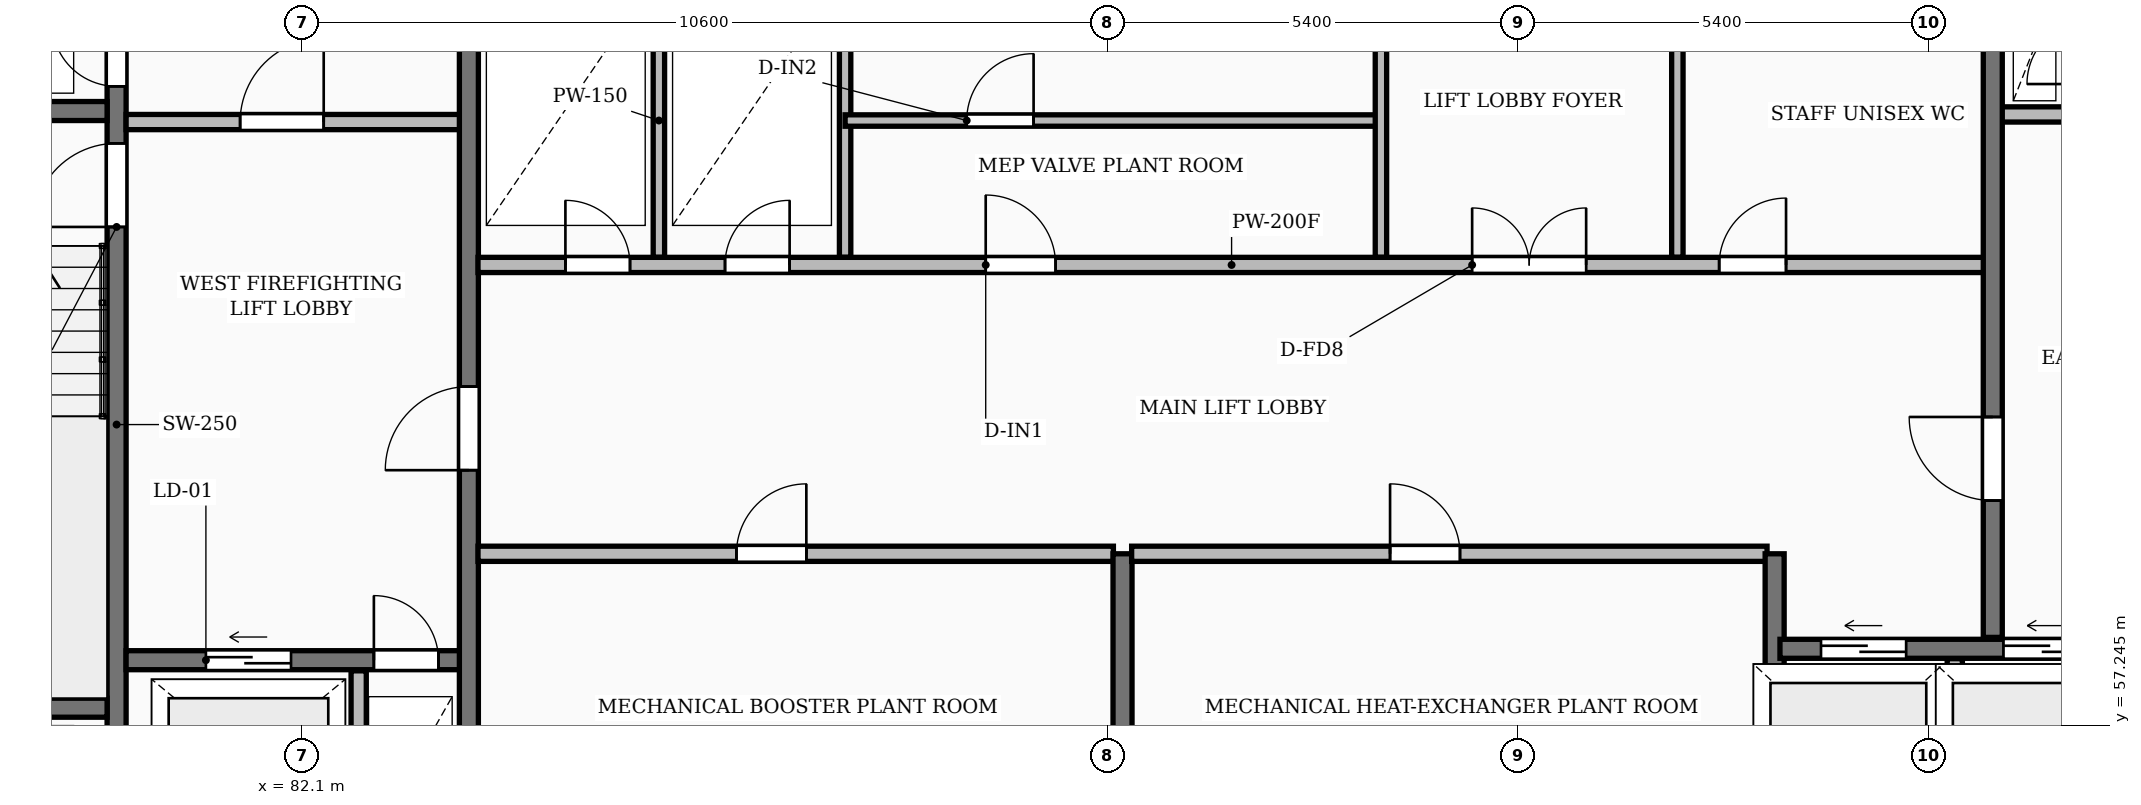
"""IFC4 building model, lengths in metres.
Left out: names, types, materials, properties, quantities, classifications, styles, units other than length and angle.
Written with IfcOpenShell. Run it as: python <this file> out.ifc"""

import sys

from ifc_helpers import new_model, si_unit, direction, frame, frame_2d, origin, place, context, subcontext, project, spatial, rectangle, extrude, element, fill, save


model = new_model("IFC4")
c1 = context("Model", 3, precision=1e-05, world=origin(), true_north=direction((0.0, 1.0)))
c2 = subcontext(c1, "Body", "Model", "MODEL_VIEW")
j1 = project(units=[si_unit("LENGTHUNIT", "METRE"), si_unit("PLANEANGLEUNIT", "RADIAN")], contexts=[c1])
p1 = place(None, origin())
s1 = spatial("IfcSite", under=j1, at=p1, CompositionType="ELEMENT")
p2 = place(p1, origin())
s2 = spatial("IfcBuilding", under=s1, at=p2, CompositionType="ELEMENT")
p3 = place(p2, frame((0.0, 0.0, 204.35)))
s3 = spatial("IfcBuildingStorey", under=s2, at=p3, CompositionType="ELEMENT", Elevation=204.35)
p4 = place(p3, frame((79.665, 55.4, 0.0), z_axis=(0.0, 0.0, 1.0), x_axis=(0.0, 1.0, 0.0)))
e1 = element("IfcWall", 1, at=p4, inside=s3, PredefinedType="SHEAR", context=c2, shape_type="SweptSolid", body=[
    extrude(rectangle(XDim=11.6, YDim=0.25, at=frame_2d((5.8, 0.0))), origin(), (0.0, 0.0, 1.0), 3.25),
])
p5 = place(p4, frame((0.55, 0.0, 0.0)))
e2 = element("IfcOpeningElement", 2, at=p5, cuts=e1, PredefinedType="OPENING", context=c2, shape_type="SweptSolid", body=[
    extrude(rectangle(XDim=0.85, YDim=2.05, at=frame_2d((0.425, 1.025))), frame((0.0, 0.135, 0.0), z_axis=(0.0, -1.0, 0.0), x_axis=(1.0, 0.0, 0.0)), (0.0, 0.0, 1.0), 0.27),
])
p6 = place(p4, frame((8.4, 0.0, 0.0)))
e3 = element("IfcOpeningElement", 3, at=p6, cuts=e1, PredefinedType="OPENING", context=c2, shape_type="SweptSolid", body=[
    extrude(rectangle(XDim=1.1, YDim=2.1, at=frame_2d((0.55, 1.05))), frame((0.0, 0.135, 0.0), z_axis=(0.0, -1.0, 0.0), x_axis=(1.0, 0.0, 0.0)), (0.0, 0.0, 1.0), 0.27),
])
p7 = place(p4, frame((10.25, 0.0, 0.0)))
e4 = element("IfcOpeningElement", 4, at=p7, cuts=e1, PredefinedType="OPENING", context=c2, shape_type="SweptSolid", body=[
    extrude(rectangle(XDim=0.85, YDim=2.05, at=frame_2d((0.425, 1.025))), frame((0.0, 0.135, 0.0), z_axis=(0.0, -1.0, 0.0), x_axis=(1.0, 0.0, 0.0)), (0.0, 0.0, 1.0), 0.27),
])
for number, where, z_axis, x_axis in (
    (5, (76.3, 57.475, 0.0), (0.0, 0.0, 1.0), (1.0, 0.0, 0.0)),
    (6, (76.3, 65.325, 0.0), (0.0, 0.0, 1.0), (1.0, 0.0, 0.0)),
):
    element("IfcWall", number, at=place(p3, frame(where, z_axis=z_axis, x_axis=x_axis)), inside=s3, PredefinedType="SHEAR", context=c2, shape_type="SweptSolid", body=[
        extrude(rectangle(XDim=3.24, YDim=0.25, at=frame_2d((1.62, 0.0))), origin(), (0.0, 0.0, 1.0), 3.25),
    ])
p8 = place(p3, frame((79.79, 58.1, 0.0), z_axis=(0.0, 0.0, 1.0), x_axis=(1.0, 0.0, 0.0)))
e7 = element("IfcWall", 7, at=p8, inside=s3, PredefinedType="SHEAR", context=c2, shape_type="SweptSolid", body=[
    extrude(rectangle(XDim=4.39, YDim=0.25, at=frame_2d((2.195, 0.0))), origin(), (0.0, 0.0, 1.0), 3.25),
])
p9 = place(p8, frame((1.05, 0.0, 0.0)))
e8 = element("IfcOpeningElement", 8, at=p9, cuts=e7, PredefinedType="OPENING", context=c2, shape_type="SweptSolid", body=[
    extrude(rectangle(XDim=1.12, YDim=2.12, at=frame_2d((0.56, 1.06))), frame((0.0, 0.135, 0.0), z_axis=(0.0, -1.0, 0.0), x_axis=(1.0, 0.0, 0.0)), (0.0, 0.0, 1.0), 0.27),
])
p10 = place(p8, frame((3.26, 0.0, 0.0)))
e9 = element("IfcOpeningElement", 9, at=p10, cuts=e7, PredefinedType="OPENING", context=c2, shape_type="SweptSolid", body=[
    extrude(rectangle(XDim=0.85, YDim=2.05, at=frame_2d((0.425, 1.025))), frame((0.0, 0.135, 0.0), z_axis=(0.0, -1.0, 0.0), x_axis=(1.0, 0.0, 0.0)), (0.0, 0.0, 1.0), 0.27),
])
p11 = place(p3, frame((82.85, 55.4, 0.0), z_axis=(0.0, 0.0, 1.0), x_axis=(0.0, 1.0, 0.0)))
e10 = element("IfcWall", 10, at=p11, inside=s3, PredefinedType="PARTITIONING", context=c2, shape_type="SweptSolid", body=[
    extrude(rectangle(XDim=2.56, YDim=0.2, at=frame_2d((1.28, 0.0))), origin(), (0.0, 0.0, 1.0), 2.98),
])
p12 = place(p3, frame((79.79, 65.18, 0.0), z_axis=(0.0, 0.0, 1.0), x_axis=(1.0, 0.0, 0.0)))
e11 = element("IfcWall", 11, at=p12, inside=s3, PredefinedType="PARTITIONING", context=c2, shape_type="SweptSolid", body=[
    extrude(rectangle(XDim=4.39, YDim=0.2, at=frame_2d((2.195, 0.0))), origin(), (0.0, 0.0, 1.0), 2.98),
])
p13 = place(p12, frame((1.5, 0.0, 0.0)))
e12 = element("IfcOpeningElement", 12, at=p13, cuts=e11, PredefinedType="OPENING", context=c2, shape_type="SweptSolid", body=[
    extrude(rectangle(XDim=1.1, YDim=2.1, at=frame_2d((0.55, 1.05))), frame((0.0, 0.11, 0.0), z_axis=(0.0, -1.0, 0.0), x_axis=(1.0, 0.0, 0.0)), (0.0, 0.0, 1.0), 0.22),
])
p14 = place(p3, frame((84.3, 55.4, 0.0), z_axis=(0.0, 0.0, 1.0), x_axis=(0.0, 1.0, 0.0)))
e13 = element("IfcWall", 13, at=p14, inside=s3, PredefinedType="SHEAR", context=c2, shape_type="SweptSolid", body=[
    extrude(rectangle(XDim=11.6, YDim=0.25, at=frame_2d((5.8, 0.0))), origin(), (0.0, 0.0, 1.0), 3.25),
])
p15 = place(p14, frame((5.2, 0.0, 0.0)))
e14 = element("IfcOpeningElement", 14, at=p15, cuts=e13, PredefinedType="OPENING", context=c2, shape_type="SweptSolid", body=[
    extrude(rectangle(XDim=1.1, YDim=2.1, at=frame_2d((0.55, 1.05))), frame((0.0, 0.135, 0.0), z_axis=(0.0, -1.0, 0.0), x_axis=(1.0, 0.0, 0.0)), (0.0, 0.0, 1.0), 0.27),
])
p16 = place(p3, frame((84.42, 59.5, 0.0), z_axis=(0.0, 0.0, 1.0), x_axis=(1.0, 0.0, 0.0)))
e15 = element("IfcWall", 15, at=p16, inside=s3, PredefinedType="PARTITIONING", context=c2, shape_type="SweptSolid", body=[
    extrude(rectangle(XDim=8.36, YDim=0.2, at=frame_2d((4.18, 0.0))), origin(), (0.0, 0.0, 1.0), 2.98),
])
p17 = place(p16, frame((3.4, 0.0, 0.0)))
e16 = element("IfcOpeningElement", 16, at=p17, cuts=e15, PredefinedType="OPENING", context=c2, shape_type="SweptSolid", body=[
    extrude(rectangle(XDim=0.92, YDim=2.08, at=frame_2d((0.46, 1.04))), frame((0.0, 0.11, 0.0), z_axis=(0.0, -1.0, 0.0), x_axis=(1.0, 0.0, 0.0)), (0.0, 0.0, 1.0), 0.22),
])
p18 = place(p3, frame((92.9, 55.4, 0.0), z_axis=(0.0, 0.0, 1.0), x_axis=(0.0, 1.0, 0.0)))
e17 = element("IfcWall", 17, at=p18, inside=s3, PredefinedType="SHEAR", context=c2, shape_type="SweptSolid", body=[
    extrude(rectangle(XDim=4.1, YDim=0.25, at=frame_2d((2.05, 0.0))), origin(), (0.0, 0.0, 1.0), 3.25),
])
p19 = place(p3, frame((93.02, 59.5, 0.0), z_axis=(0.0, 0.0, 1.0), x_axis=(1.0, 0.0, 0.0)))
e18 = element("IfcWall", 18, at=p19, inside=s3, PredefinedType="PARTITIONING", context=c2, shape_type="SweptSolid", body=[
    extrude(rectangle(XDim=8.36, YDim=0.2, at=frame_2d((4.18, 0.0))), origin(), (0.0, 0.0, 1.0), 2.98),
])
p20 = place(p19, frame((3.4, 0.0, 0.0)))
e19 = element("IfcOpeningElement", 19, at=p20, cuts=e18, PredefinedType="OPENING", context=c2, shape_type="SweptSolid", body=[
    extrude(rectangle(XDim=0.92, YDim=2.08, at=frame_2d((0.46, 1.04))), frame((0.0, 0.11, 0.0), z_axis=(0.0, -1.0, 0.0), x_axis=(1.0, 0.0, 0.0)), (0.0, 0.0, 1.0), 0.22),
])
p21 = place(p3, frame((101.48, 55.4, 0.0), z_axis=(0.0, 0.0, 1.0), x_axis=(0.0, 1.0, 0.0)))
e20 = element("IfcWall", 20, at=p21, inside=s3, PredefinedType="SHEAR", context=c2, shape_type="SweptSolid", body=[
    extrude(rectangle(XDim=4.1, YDim=0.25, at=frame_2d((2.05, 0.0))), origin(), (0.0, 0.0, 1.0), 3.25),
])
p22 = place(p3, frame((103.85, 55.4, 0.0), z_axis=(0.0, 0.0, 1.0), x_axis=(0.0, 1.0, 0.0)))
e21 = element("IfcWall", 21, at=p22, inside=s3, PredefinedType="PARTITIONING", context=c2, shape_type="SweptSolid", body=[
    extrude(rectangle(XDim=2.72, YDim=0.2, at=frame_2d((1.36, 0.0))), origin(), (0.0, 0.0, 1.0), 2.98),
])
p23 = place(p3, frame((101.55, 58.25, 0.0), z_axis=(0.0, 0.0, 1.0), x_axis=(1.0, 0.0, 0.0)))
e22 = element("IfcWall", 22, at=p23, inside=s3, PredefinedType="SHEAR", context=c2, shape_type="SweptSolid", body=[
    extrude(rectangle(XDim=4.6, YDim=0.25, at=frame_2d((2.3, 0.0))), origin(), (0.0, 0.0, 1.0), 3.25),
])
p24 = place(p23, frame((0.54, 0.0, 0.0)))
e23 = element("IfcOpeningElement", 23, at=p24, cuts=e22, PredefinedType="OPENING", context=c2, shape_type="SweptSolid", body=[
    extrude(rectangle(XDim=1.12, YDim=2.12, at=frame_2d((0.56, 1.06))), frame((0.0, 0.135, 0.0), z_axis=(0.0, -1.0, 0.0), x_axis=(1.0, 0.0, 0.0)), (0.0, 0.0, 1.0), 0.27),
])
p25 = place(p23, frame((2.94, 0.0, 0.0)))
e24 = element("IfcOpeningElement", 24, at=p25, cuts=e22, PredefinedType="OPENING", context=c2, shape_type="SweptSolid", body=[
    extrude(rectangle(XDim=1.12, YDim=2.12, at=frame_2d((0.56, 1.06))), frame((0.0, 0.135, 0.0), z_axis=(0.0, -1.0, 0.0), x_axis=(1.0, 0.0, 0.0)), (0.0, 0.0, 1.0), 0.27),
])
for number, where, z_axis, x_axis in (
    (25, (86.8, 63.4, 0.0), (0.0, 0.0, 1.0), (0.0, 1.0, 0.0)),
    (26, (89.25, 63.4, 0.0), (0.0, 0.0, 1.0), (0.0, 1.0, 0.0)),
):
    element("IfcWall", number, at=place(p3, frame(where, z_axis=z_axis, x_axis=x_axis)), inside=s3, PredefinedType="PARTITIONING", context=c2, shape_type="SweptSolid", body=[
        extrude(rectangle(XDim=3.6, YDim=0.15, at=frame_2d((1.8, 0.0))), origin(), (0.0, 0.0, 1.0), 2.98),
    ])
p26 = place(p3, frame((89.25, 65.2, 0.0), z_axis=(0.0, 0.0, 1.0), x_axis=(1.0, 0.0, 0.0)))
e27 = element("IfcWall", 27, at=p26, inside=s3, PredefinedType="PARTITIONING", context=c2, shape_type="SweptSolid", body=[
    extrude(rectangle(XDim=7.05, YDim=0.15, at=frame_2d((3.525, 0.0))), origin(), (0.0, 0.0, 1.0), 2.98),
])
p27 = place(p26, frame((1.6, 0.0, 0.0)))
e28 = element("IfcOpeningElement", 28, at=p27, cuts=e27, PredefinedType="OPENING", context=c2, shape_type="SweptSolid", body=[
    extrude(rectangle(XDim=0.88, YDim=2.06, at=frame_2d((0.44, 1.03))), frame((0.0, 0.085, 0.0), z_axis=(0.0, -1.0, 0.0), x_axis=(1.0, 0.0, 0.0)), (0.0, 0.0, 1.0), 0.17),
])
for number, where, z_axis, x_axis in (
    (29, (96.3, 63.4, 0.0), (0.0, 0.0, 1.0), (0.0, 1.0, 0.0)),
    (30, (100.2, 63.4, 0.0), (0.0, 0.0, 1.0), (0.0, 1.0, 0.0)),
):
    element("IfcWall", number, at=place(p3, frame(where, z_axis=z_axis, x_axis=x_axis)), inside=s3, PredefinedType="PARTITIONING", context=c2, shape_type="SweptSolid", body=[
        extrude(rectangle(XDim=3.6, YDim=0.15, at=frame_2d((1.8, 0.0))), origin(), (0.0, 0.0, 1.0), 2.98),
    ])
p28 = place(p3, frame((84.42, 63.3, 0.0), z_axis=(0.0, 0.0, 1.0), x_axis=(1.0, 0.0, 0.0)))
e31 = element("IfcWall", 31, at=p28, inside=s3, PredefinedType="PARTITIONING", context=c2, shape_type="SweptSolid", body=[
    extrude(rectangle(XDim=19.83, YDim=0.2, at=frame_2d((9.915, 0.0))), origin(), (0.0, 0.0, 1.0), 2.98),
])
p29 = place(p28, frame((1.15, 0.0, 0.0)))
e32 = element("IfcOpeningElement", 32, at=p29, cuts=e31, PredefinedType="OPENING", context=c2, shape_type="SweptSolid", body=[
    extrude(rectangle(XDim=0.85, YDim=2.05, at=frame_2d((0.425, 1.025))), frame((0.0, 0.11, 0.0), z_axis=(0.0, -1.0, 0.0), x_axis=(1.0, 0.0, 0.0)), (0.0, 0.0, 1.0), 0.22),
])
p30 = place(p28, frame((3.25, 0.0, 0.0)))
e33 = element("IfcOpeningElement", 33, at=p30, cuts=e31, PredefinedType="OPENING", context=c2, shape_type="SweptSolid", body=[
    extrude(rectangle(XDim=0.85, YDim=2.05, at=frame_2d((0.425, 1.025))), frame((0.0, 0.11, 0.0), z_axis=(0.0, -1.0, 0.0), x_axis=(1.0, 0.0, 0.0)), (0.0, 0.0, 1.0), 0.22),
])
p31 = place(p28, frame((13.08, 0.0, 0.0)))
e34 = element("IfcOpeningElement", 34, at=p31, cuts=e31, PredefinedType="OPENING", context=c2, shape_type="SweptSolid", body=[
    extrude(rectangle(XDim=1.5, YDim=2.2, at=frame_2d((0.75, 1.1))), frame((0.0, 0.11, 0.0), z_axis=(0.0, -1.0, 0.0), x_axis=(1.0, 0.0, 0.0)), (0.0, 0.0, 1.0), 0.22),
])
p32 = place(p28, frame((6.68, 0.0, 0.0)))
e35 = element("IfcOpeningElement", 35, at=p32, cuts=e31, PredefinedType="OPENING", context=c2, shape_type="SweptSolid", body=[
    extrude(rectangle(XDim=0.92, YDim=2.08, at=frame_2d((0.46, 1.04))), frame((0.0, 0.11, 0.0), z_axis=(0.0, -1.0, 0.0), x_axis=(1.0, 0.0, 0.0)), (0.0, 0.0, 1.0), 0.22),
])
p33 = place(p28, frame((16.33, 0.0, 0.0)))
e36 = element("IfcOpeningElement", 36, at=p33, cuts=e31, PredefinedType="OPENING", context=c2, shape_type="SweptSolid", body=[
    extrude(rectangle(XDim=0.88, YDim=2.06, at=frame_2d((0.44, 1.03))), frame((0.0, 0.11, 0.0), z_axis=(0.0, -1.0, 0.0), x_axis=(1.0, 0.0, 0.0)), (0.0, 0.0, 1.0), 0.22),
])
p34 = place(p3, frame((104.45, 65.28, 0.0), z_axis=(0.0, 0.0, 1.0), x_axis=(1.0, 0.0, 0.0)))
e37 = element("IfcWall", 37, at=p34, inside=s3, PredefinedType="PARTITIONING", context=c2, shape_type="SweptSolid", body=[
    extrude(rectangle(XDim=1.2, YDim=0.2, at=frame_2d((0.6, 0.0))), origin(), (0.0, 0.0, 1.0), 2.98),
])
p35 = place(p3, frame((104.35, 58.4, 0.0), z_axis=(0.0, 0.0, 1.0), x_axis=(0.0, 1.0, 0.0)))
e38 = element("IfcWall", 38, at=p35, inside=s3, PredefinedType="SHEAR", context=c2, shape_type="SweptSolid", body=[
    extrude(rectangle(XDim=8.6, YDim=0.25, at=frame_2d((4.3, 0.0))), origin(), (0.0, 0.0, 1.0), 3.25),
])
p36 = place(p35, frame((1.8, 0.0, 0.0)))
e39 = element("IfcOpeningElement", 39, at=p36, cuts=e38, PredefinedType="OPENING", context=c2, shape_type="SweptSolid", body=[
    extrude(rectangle(XDim=1.1, YDim=2.1, at=frame_2d((0.55, 1.05))), frame((0.0, 0.135, 0.0), z_axis=(0.0, -1.0, 0.0), x_axis=(1.0, 0.0, 0.0)), (0.0, 0.0, 1.0), 0.27),
])
p37 = place(p6, origin())
e40 = element("IfcDoor", 40, at=p37, inside=s3, OperationType="SINGLE_SWING_LEFT", PredefinedType="DOOR", context=c2, shape_type="SweptSolid", body=[
    extrude(rectangle(XDim=1.1, YDim=2.1, at=frame_2d((0.55, 1.05))), frame((0.0, 0.025, 0.0), z_axis=(0.0, -1.0, 0.0), x_axis=(1.0, 0.0, 0.0)), (0.0, 0.0, 1.0), 0.05),
])
fill(e3, e40)
p38 = place(p7, origin())
e41 = element("IfcDoor", 41, at=p38, inside=s3, OperationType="SINGLE_SWING_RIGHT", PredefinedType="DOOR", context=c2, shape_type="SweptSolid", body=[
    extrude(rectangle(XDim=0.85, YDim=2.05, at=frame_2d((0.425, 1.025))), frame((0.0, 0.025, 0.0), z_axis=(0.0, -1.0, 0.0), x_axis=(1.0, 0.0, 0.0)), (0.0, 0.0, 1.0), 0.05),
])
fill(e4, e41)
p39 = place(p9, origin())
e42 = element("IfcDoor", 42, at=p39, inside=s3, OperationType="SLIDING_TO_LEFT", PredefinedType="DOOR", context=c2, shape_type="SweptSolid", body=[
    extrude(rectangle(XDim=1.12, YDim=2.12, at=frame_2d((0.56, 1.06))), frame((0.0, 0.025, 0.0), z_axis=(0.0, -1.0, 0.0), x_axis=(1.0, 0.0, 0.0)), (0.0, 0.0, 1.0), 0.05),
])
fill(e8, e42)
p40 = place(p10, origin())
e43 = element("IfcDoor", 43, at=p40, inside=s3, OperationType="SINGLE_SWING_LEFT", PredefinedType="DOOR", context=c2, shape_type="SweptSolid", body=[
    extrude(rectangle(XDim=0.85, YDim=2.05, at=frame_2d((0.425, 1.025))), frame((0.0, 0.025, 0.0), z_axis=(0.0, -1.0, 0.0), x_axis=(1.0, 0.0, 0.0)), (0.0, 0.0, 1.0), 0.05),
])
fill(e9, e43)
p41 = place(p13, origin())
e44 = element("IfcDoor", 44, at=p41, inside=s3, OperationType="SINGLE_SWING_RIGHT", PredefinedType="DOOR", context=c2, shape_type="SweptSolid", body=[
    extrude(rectangle(XDim=1.1, YDim=2.1, at=frame_2d((0.55, 1.05))), frame((0.0, 0.025, 0.0), z_axis=(0.0, -1.0, 0.0), x_axis=(1.0, 0.0, 0.0)), (0.0, 0.0, 1.0), 0.05),
])
fill(e12, e44)
p42 = place(p15, origin())
e45 = element("IfcDoor", 45, at=p42, inside=s3, OperationType="SINGLE_SWING_LEFT", PredefinedType="DOOR", context=c2, shape_type="SweptSolid", body=[
    extrude(rectangle(XDim=1.1, YDim=2.1, at=frame_2d((0.55, 1.05))), frame((0.0, 0.025, 0.0), z_axis=(0.0, -1.0, 0.0), x_axis=(1.0, 0.0, 0.0)), (0.0, 0.0, 1.0), 0.05),
])
fill(e14, e45)
p43 = place(p17, origin())
e46 = element("IfcDoor", 46, at=p43, inside=s3, OperationType="SINGLE_SWING_RIGHT", PredefinedType="DOOR", context=c2, shape_type="SweptSolid", body=[
    extrude(rectangle(XDim=0.92, YDim=2.08, at=frame_2d((0.46, 1.04))), frame((0.0, 0.025, 0.0), z_axis=(0.0, -1.0, 0.0), x_axis=(1.0, 0.0, 0.0)), (0.0, 0.0, 1.0), 0.05),
])
fill(e16, e46)
p44 = place(p20, origin())
e47 = element("IfcDoor", 47, at=p44, inside=s3, OperationType="SINGLE_SWING_LEFT", PredefinedType="DOOR", context=c2, shape_type="SweptSolid", body=[
    extrude(rectangle(XDim=0.92, YDim=2.08, at=frame_2d((0.46, 1.04))), frame((0.0, 0.025, 0.0), z_axis=(0.0, -1.0, 0.0), x_axis=(1.0, 0.0, 0.0)), (0.0, 0.0, 1.0), 0.05),
])
fill(e19, e47)
p45 = place(p24, origin())
e48 = element("IfcDoor", 48, at=p45, inside=s3, OperationType="SLIDING_TO_LEFT", PredefinedType="DOOR", context=c2, shape_type="SweptSolid", body=[
    extrude(rectangle(XDim=1.12, YDim=2.12, at=frame_2d((0.56, 1.06))), frame((0.0, 0.025, 0.0), z_axis=(0.0, -1.0, 0.0), x_axis=(1.0, 0.0, 0.0)), (0.0, 0.0, 1.0), 0.05),
])
fill(e23, e48)
p46 = place(p25, origin())
e49 = element("IfcDoor", 49, at=p46, inside=s3, OperationType="SLIDING_TO_LEFT", PredefinedType="DOOR", context=c2, shape_type="SweptSolid", body=[
    extrude(rectangle(XDim=1.12, YDim=2.12, at=frame_2d((0.56, 1.06))), frame((0.0, 0.025, 0.0), z_axis=(0.0, -1.0, 0.0), x_axis=(1.0, 0.0, 0.0)), (0.0, 0.0, 1.0), 0.05),
])
fill(e24, e49)
p47 = place(p27, origin())
e50 = element("IfcDoor", 50, at=p47, inside=s3, OperationType="SINGLE_SWING_RIGHT", PredefinedType="DOOR", context=c2, shape_type="SweptSolid", body=[
    extrude(rectangle(XDim=0.88, YDim=2.06, at=frame_2d((0.44, 1.03))), frame((0.0, 0.025, 0.0), z_axis=(0.0, -1.0, 0.0), x_axis=(1.0, 0.0, 0.0)), (0.0, 0.0, 1.0), 0.05),
])
fill(e28, e50)
p48 = place(p29, origin())
e51 = element("IfcDoor", 51, at=p48, inside=s3, OperationType="SINGLE_SWING_LEFT", PredefinedType="DOOR", context=c2, shape_type="SweptSolid", body=[
    extrude(rectangle(XDim=0.85, YDim=2.05, at=frame_2d((0.425, 1.025))), frame((0.0, 0.025, 0.0), z_axis=(0.0, -1.0, 0.0), x_axis=(1.0, 0.0, 0.0)), (0.0, 0.0, 1.0), 0.05),
])
fill(e32, e51)
p49 = place(p30, origin())
e52 = element("IfcDoor", 52, at=p49, inside=s3, OperationType="SINGLE_SWING_RIGHT", PredefinedType="DOOR", context=c2, shape_type="SweptSolid", body=[
    extrude(rectangle(XDim=0.85, YDim=2.05, at=frame_2d((0.425, 1.025))), frame((0.0, 0.025, 0.0), z_axis=(0.0, -1.0, 0.0), x_axis=(1.0, 0.0, 0.0)), (0.0, 0.0, 1.0), 0.05),
])
fill(e33, e52)
p50 = place(p31, origin())
e53 = element("IfcDoor", 53, at=p50, inside=s3, OperationType="DOUBLE_DOOR_SINGLE_SWING", PredefinedType="DOOR", context=c2, shape_type="SweptSolid", body=[
    extrude(rectangle(XDim=1.5, YDim=2.2, at=frame_2d((0.75, 1.1))), frame((0.0, 0.025, 0.0), z_axis=(0.0, -1.0, 0.0), x_axis=(1.0, 0.0, 0.0)), (0.0, 0.0, 1.0), 0.05),
])
fill(e34, e53)
p51 = place(p32, origin())
e54 = element("IfcDoor", 54, at=p51, inside=s3, OperationType="SINGLE_SWING_LEFT", PredefinedType="DOOR", context=c2, shape_type="SweptSolid", body=[
    extrude(rectangle(XDim=0.92, YDim=2.08, at=frame_2d((0.46, 1.04))), frame((0.0, 0.025, 0.0), z_axis=(0.0, -1.0, 0.0), x_axis=(1.0, 0.0, 0.0)), (0.0, 0.0, 1.0), 0.05),
])
fill(e35, e54)
p52 = place(p33, origin())
e55 = element("IfcDoor", 55, at=p52, inside=s3, OperationType="SINGLE_SWING_RIGHT", PredefinedType="DOOR", context=c2, shape_type="SweptSolid", body=[
    extrude(rectangle(XDim=0.88, YDim=2.06, at=frame_2d((0.44, 1.03))), frame((0.0, 0.025, 0.0), z_axis=(0.0, -1.0, 0.0), x_axis=(1.0, 0.0, 0.0)), (0.0, 0.0, 1.0), 0.05),
])
fill(e36, e55)
p53 = place(p36, origin())
e56 = element("IfcDoor", 56, at=p53, inside=s3, OperationType="SINGLE_SWING_RIGHT", PredefinedType="DOOR", context=c2, shape_type="SweptSolid", body=[
    extrude(rectangle(XDim=1.1, YDim=2.1, at=frame_2d((0.55, 1.05))), frame((0.0, 0.025, 0.0), z_axis=(0.0, -1.0, 0.0), x_axis=(1.0, 0.0, 0.0)), (0.0, 0.0, 1.0), 0.05),
])
fill(e39, e56)
save(model, sys.argv[1])
